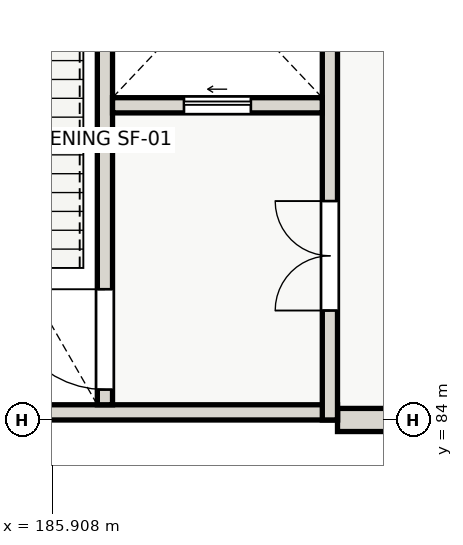
"""IFC4 building model, lengths in metres.
Left out: names, types, materials, properties, quantities, classifications, styles, units other than length and angle.
Written with IfcOpenShell. Run it as: python <this file> out.ifc"""

import sys

from ifc_helpers import new_model, si_unit, direction, frame, frame_2d, origin, place, context, subcontext, project, spatial, rectangle, extrude, element, fill, save


model = new_model("IFC4")
c1 = context("Model", 3, precision=1e-05, world=origin(), true_north=direction((0.0, 1.0)))
c2 = subcontext(c1, "Body", "Model", "MODEL_VIEW")
j1 = project(units=[si_unit("LENGTHUNIT", "METRE"), si_unit("PLANEANGLEUNIT", "RADIAN")], contexts=[c1])
p1 = place(None, origin())
s1 = spatial("IfcSite", under=j1, at=p1, CompositionType="ELEMENT")
p2 = place(p1, origin())
s2 = spatial("IfcBuilding", under=s1, at=p2, CompositionType="ELEMENT")
p3 = place(p2, frame((0.0, 0.0, 8.4)))
s3 = spatial("IfcBuildingStorey", under=s2, at=p3, CompositionType="ELEMENT", Elevation=8.4)
p4 = place(p3, frame((192.0, 84.0, 0.0), z_axis=(0.0, 0.0, 1.0), x_axis=(-1.0, 0.0, 0.0)))
e1 = element("IfcWall", 1, at=p4, inside=s3, PredefinedType="SOLIDWALL", context=c2, shape_type="SweptSolid", body=[
    extrude(rectangle(XDim=1.4, YDim=0.38, at=frame_2d((0.7, 0.0))), origin(), (0.0, 0.0, 1.0), 3.58),
])
p5 = place(p3, frame((190.6, 84.125, 0.0), z_axis=(0.0, 0.0, 1.0), x_axis=(-1.0, 0.0, 0.0)))
e2 = element("IfcWall", 2, at=p5, inside=s3, PredefinedType="SHEAR", context=c2, shape_type="SweptSolid", body=[
    extrude(rectangle(XDim=9.2, YDim=0.25, at=frame_2d((4.6, 0.0))), origin(), (0.0, 0.0, 1.0), 4.2),
])
p6 = place(p3, frame((190.475, 84.0, 0.0), z_axis=(0.0, 0.0, 1.0), x_axis=(0.0, 1.0, 0.0)))
e3 = element("IfcWall", 3, at=p6, inside=s3, PredefinedType="SHEAR", context=c2, shape_type="SweptSolid", body=[
    extrude(rectangle(XDim=9.2, YDim=0.25, at=frame_2d((4.6, 0.0))), origin(), (0.0, 0.0, 1.0), 4.2),
])
p7 = place(p6, frame((1.8, 0.0, 0.0)))
e4 = element("IfcOpeningElement", 4, at=p7, cuts=e3, PredefinedType="OPENING", context=c2, shape_type="SweptSolid", body=[
    extrude(rectangle(XDim=1.8, YDim=2.15, at=frame_2d((0.9, 1.075))), frame((0.0, 0.135, 0.0), z_axis=(0.0, -1.0, 0.0), x_axis=(1.0, 0.0, 0.0)), (0.0, 0.0, 1.0), 0.27),
])
p8 = place(p3, frame((186.775, 84.25, 0.0), z_axis=(0.0, 0.0, 1.0), x_axis=(0.0, 1.0, 0.0)))
e5 = element("IfcWall", 5, at=p8, inside=s3, PredefinedType="SHEAR", context=c2, shape_type="SweptSolid", body=[
    extrude(rectangle(XDim=8.7, YDim=0.25, at=frame_2d((4.35, 0.0))), origin(), (0.0, 0.0, 1.0), 4.2),
])
p9 = place(p8, frame((0.25, 0.0, 0.0)))
e6 = element("IfcOpeningElement", 6, at=p9, cuts=e5, PredefinedType="OPENING", context=c2, shape_type="SweptSolid", body=[
    extrude(rectangle(XDim=1.65, YDim=2.1, at=frame_2d((0.825, 1.05))), frame((0.0, 0.135, 0.0), z_axis=(0.0, -1.0, 0.0), x_axis=(1.0, 0.0, 0.0)), (0.0, 0.0, 1.0), 0.27),
])
p10 = place(p3, frame((186.9, 89.175, 0.0), z_axis=(0.0, 0.0, 1.0), x_axis=(1.0, 0.0, 0.0)))
e7 = element("IfcWall", 7, at=p10, inside=s3, PredefinedType="SHEAR", context=c2, shape_type="SweptSolid", body=[
    extrude(rectangle(XDim=3.45, YDim=0.25, at=frame_2d((1.725, 0.0))), origin(), (0.0, 0.0, 1.0), 4.2),
])
p11 = place(p10, frame((1.175, 0.0, 0.0)))
e8 = element("IfcOpeningElement", 8, at=p11, cuts=e7, PredefinedType="OPENING", context=c2, shape_type="SweptSolid", body=[
    extrude(rectangle(XDim=1.1, YDim=2.1, at=frame_2d((0.55, 1.05))), frame((0.0, 0.135, 0.0), z_axis=(0.0, -1.0, 0.0), x_axis=(1.0, 0.0, 0.0)), (0.0, 0.0, 1.0), 0.27),
])
p12 = place(p7, origin())
e9 = element("IfcDoor", 9, at=p12, inside=s3, OperationType="DOUBLE_DOOR_SINGLE_SWING", PredefinedType="DOOR", context=c2, shape_type="SweptSolid", body=[
    extrude(rectangle(XDim=1.8, YDim=2.15, at=frame_2d((0.9, 1.075))), frame((0.0, 0.025, 0.0), z_axis=(0.0, -1.0, 0.0), x_axis=(1.0, 0.0, 0.0)), (0.0, 0.0, 1.0), 0.05),
])
fill(e4, e9)
p13 = place(p9, origin())
e10 = element("IfcDoor", 10, at=p13, inside=s3, OperationType="SINGLE_SWING_RIGHT", PredefinedType="DOOR", context=c2, shape_type="SweptSolid", body=[
    extrude(rectangle(XDim=1.65, YDim=2.1, at=frame_2d((0.825, 1.05))), frame((0.0, 0.025, 0.0), z_axis=(0.0, -1.0, 0.0), x_axis=(1.0, 0.0, 0.0)), (0.0, 0.0, 1.0), 0.05),
])
fill(e6, e10)
p14 = place(p11, origin())
e11 = element("IfcDoor", 11, at=p14, inside=s3, OperationType="SLIDING_TO_LEFT", PredefinedType="DOOR", context=c2, shape_type="SweptSolid", body=[
    extrude(rectangle(XDim=1.1, YDim=2.1, at=frame_2d((0.55, 1.05))), frame((0.0, 0.025, 0.0), z_axis=(0.0, -1.0, 0.0), x_axis=(1.0, 0.0, 0.0)), (0.0, 0.0, 1.0), 0.05),
])
fill(e8, e11)
save(model, sys.argv[1])
